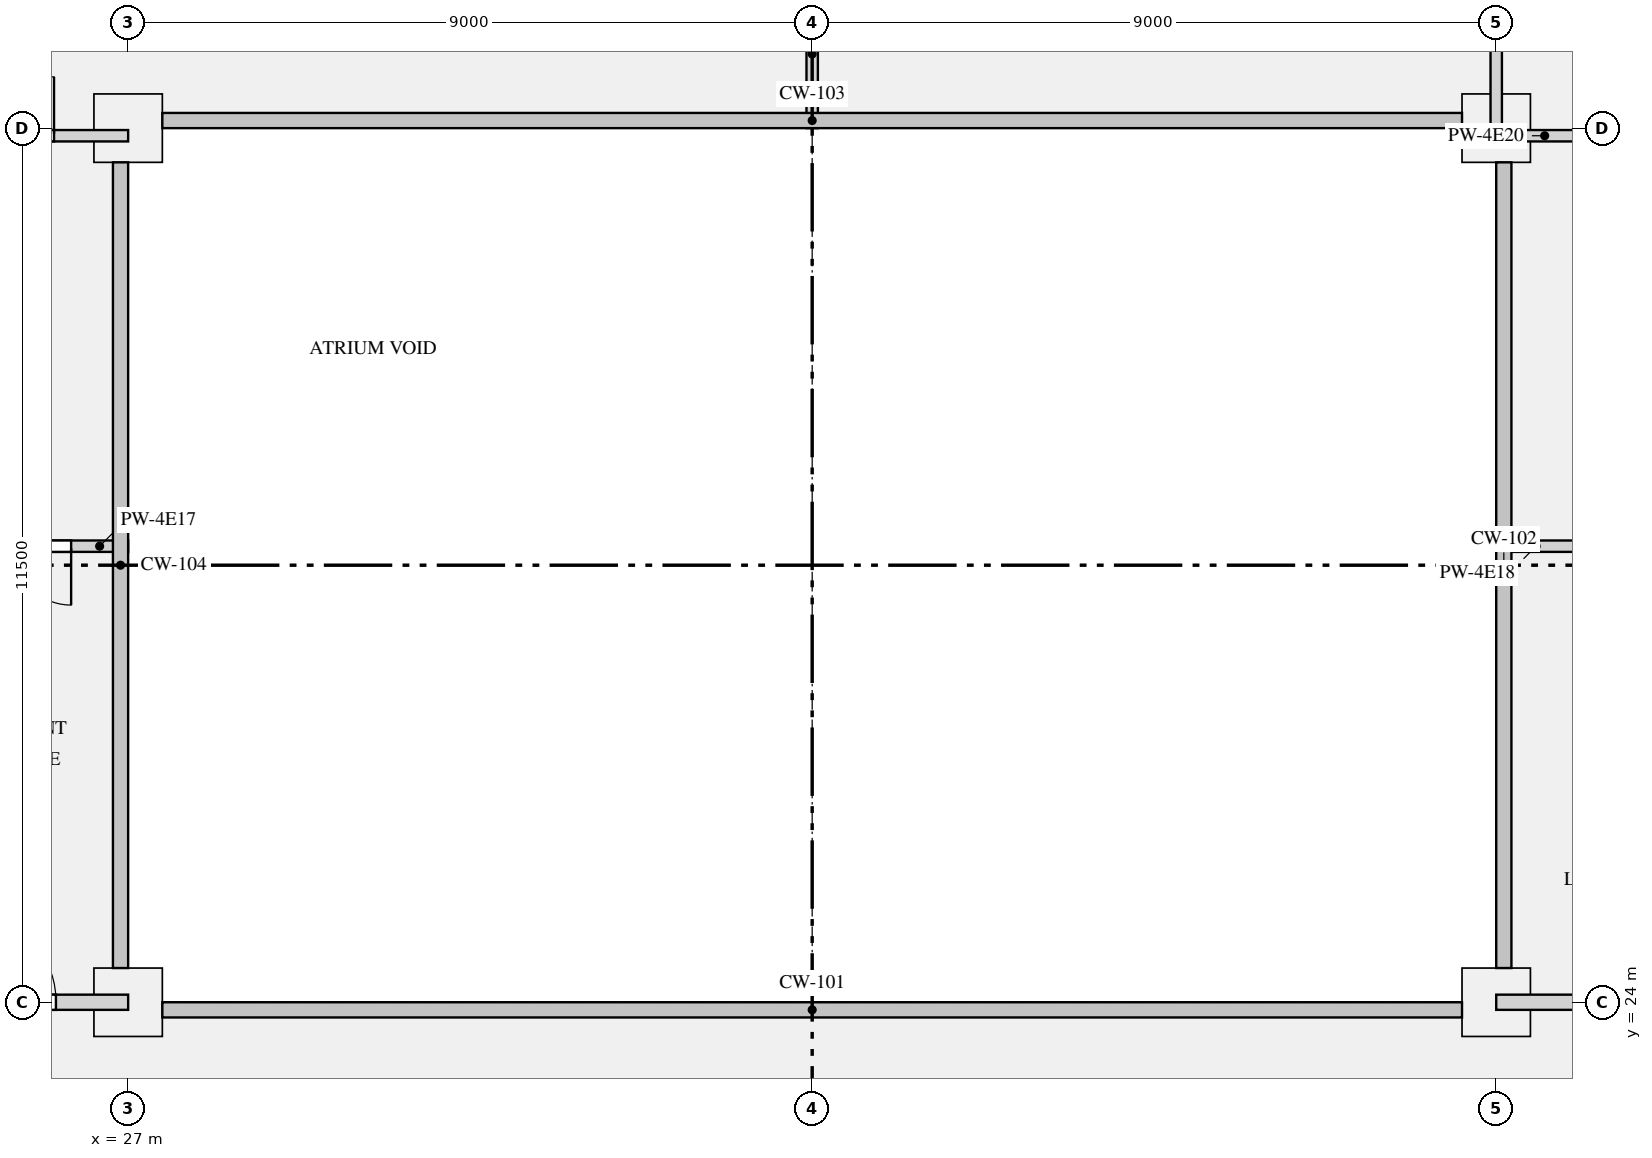
"""IFC4 building model, lengths in metres.
Left out: names, types, materials, properties, quantities, classifications, styles, units other than length and angle.
Written with IfcOpenShell. Run it as: python <this file> out.ifc"""

import sys

from ifc_helpers import new_model, si_unit, direction, frame, frame_2d, origin, origin_2d, place, context, subcontext, project, spatial, rectangle, extrude, element, fill, save


model = new_model("IFC4")
c1 = context("Model", 3, precision=1e-05, world=origin(), true_north=direction((0.0, 1.0)))
c2 = subcontext(c1, "Body", "Model", "MODEL_VIEW")
j1 = project(units=[si_unit("LENGTHUNIT", "METRE"), si_unit("PLANEANGLEUNIT", "RADIAN")], contexts=[c1])
p1 = place(None, origin())
s1 = spatial("IfcSite", under=j1, at=p1, CompositionType="ELEMENT")
p2 = place(p1, origin())
s2 = spatial("IfcBuilding", under=s1, at=p2, CompositionType="ELEMENT")
p3 = place(p2, frame((0.0, 0.0, 232.65)))
s3 = spatial("IfcBuildingStorey", under=s2, at=p3, CompositionType="ELEMENT", Elevation=232.65)
for number, where, z_axis, x_axis in (
    (1, (27.0, 24.0, 0.0), (0.0, 0.0, 1.0), (1.0, 0.0, 0.0)),
    (2, (45.0, 24.0, 0.0), (0.0, 0.0, 1.0), (1.0, 0.0, 0.0)),
    (3, (27.0, 35.5, 0.0), (0.0, 0.0, 1.0), (1.0, 0.0, 0.0)),
    (4, (45.0, 35.5, 0.0), (0.0, 0.0, 1.0), (1.0, 0.0, 0.0)),
):
    element("IfcColumn", number, at=place(p3, frame(where, z_axis=z_axis, x_axis=x_axis)), inside=s3, PredefinedType="COLUMN", context=c2, shape_type="SweptSolid", body=[
        extrude(rectangle(XDim=0.9, YDim=0.9, at=origin_2d()), origin(), (0.0, 0.0, 1.0), 3.15),
    ])
p4 = place(p3, frame((23.9, 24.0, 0.0), z_axis=(0.0, 0.0, 1.0), x_axis=(1.0, 0.0, 0.0)))
e5 = element("IfcWall", 5, at=p4, inside=s3, PredefinedType="PARTITIONING", context=c2, shape_type="SweptSolid", body=[
    extrude(rectangle(XDim=3.1, YDim=0.2, at=frame_2d((1.55, 0.0))), origin(), (0.0, 0.0, 1.0), 2.8),
])
p5 = place(p4, frame((1.05, 0.0, 0.0)))
e6 = element("IfcOpeningElement", 6, at=p5, cuts=e5, PredefinedType="OPENING", context=c2, shape_type="SweptSolid", body=[
    extrude(rectangle(XDim=1.1, YDim=2.1, at=frame_2d((0.55, 1.05))), frame((0.0, 0.11, 0.0), z_axis=(0.0, -1.0, 0.0), x_axis=(1.0, 0.0, 0.0)), (0.0, 0.0, 1.0), 0.22),
])
p6 = place(p3, frame((45.0, 24.0, 0.0), z_axis=(0.0, 0.0, 1.0), x_axis=(1.0, 0.0, 0.0)))
e7 = element("IfcWall", 7, at=p6, inside=s3, PredefinedType="PARTITIONING", context=c2, shape_type="SweptSolid", body=[
    extrude(rectangle(XDim=3.1, YDim=0.2, at=frame_2d((1.55, 0.0))), origin(), (0.0, 0.0, 1.0), 2.8),
])
p7 = place(p3, frame((24.075, 30.0, 0.0), z_axis=(0.0, 0.0, 1.0), x_axis=(1.0, 0.0, 0.0)))
e8 = element("IfcWall", 8, at=p7, inside=s3, PredefinedType="PARTITIONING", context=c2, shape_type="SweptSolid", body=[
    extrude(rectangle(XDim=2.925, YDim=0.15, at=frame_2d((1.462, 0.0))), origin(), (0.0, 0.0, 1.0), 2.8),
])
p8 = place(p7, frame((0.675, 0.0, 0.0)))
e9 = element("IfcOpeningElement", 9, at=p8, cuts=e8, PredefinedType="OPENING", context=c2, shape_type="SweptSolid", body=[
    extrude(rectangle(XDim=1.5, YDim=2.1, at=frame_2d((0.75, 1.05))), frame((0.0, 0.085, 0.0), z_axis=(0.0, -1.0, 0.0), x_axis=(1.0, 0.0, 0.0)), (0.0, 0.0, 1.0), 0.17),
])
p9 = place(p3, frame((45.0, 30.0, 0.0), z_axis=(0.0, 0.0, 1.0), x_axis=(1.0, 0.0, 0.0)))
e10 = element("IfcWall", 10, at=p9, inside=s3, PredefinedType="PARTITIONING", context=c2, shape_type="SweptSolid", body=[
    extrude(rectangle(XDim=2.9, YDim=0.15, at=frame_2d((1.45, 0.0))), origin(), (0.0, 0.0, 1.0), 2.8),
])
p10 = place(p9, frame((1.05, 0.0, 0.0)))
e11 = element("IfcOpeningElement", 11, at=p10, cuts=e10, PredefinedType="OPENING", context=c2, shape_type="SweptSolid", body=[
    extrude(rectangle(XDim=0.9, YDim=2.1, at=frame_2d((0.45, 1.05))), frame((0.0, 0.085, 0.0), z_axis=(0.0, -1.0, 0.0), x_axis=(1.0, 0.0, 0.0)), (0.0, 0.0, 1.0), 0.17),
])
p11 = place(p3, frame((15.8, 35.4, 0.0), z_axis=(0.0, 0.0, 1.0), x_axis=(1.0, 0.0, 0.0)))
e12 = element("IfcWall", 12, at=p11, inside=s3, PredefinedType="PARTITIONING", context=c2, shape_type="SweptSolid", body=[
    extrude(rectangle(XDim=11.2, YDim=0.15, at=frame_2d((5.6, 0.0))), origin(), (0.0, 0.0, 1.0), 2.8),
])
p12 = place(p11, frame((8.725, 0.0, 0.0)))
e13 = element("IfcOpeningElement", 13, at=p12, cuts=e12, PredefinedType="OPENING", context=c2, shape_type="SweptSolid", body=[
    extrude(rectangle(XDim=1.5, YDim=2.1, at=frame_2d((0.75, 1.05))), frame((0.0, 0.085, 0.0), z_axis=(0.0, -1.0, 0.0), x_axis=(1.0, 0.0, 0.0)), (0.0, 0.0, 1.0), 0.17),
])
p13 = place(p11, frame((7.0, 0.0, 0.0)))
e14 = element("IfcOpeningElement", 14, at=p13, cuts=e12, PredefinedType="OPENING", context=c2, shape_type="SweptSolid", body=[
    extrude(rectangle(XDim=0.9, YDim=2.1, at=frame_2d((0.45, 1.05))), frame((0.0, 0.085, 0.0), z_axis=(0.0, -1.0, 0.0), x_axis=(1.0, 0.0, 0.0)), (0.0, 0.0, 1.0), 0.17),
])
p14 = place(p11, frame((3.225, 0.0, 0.0)))
e15 = element("IfcOpeningElement", 15, at=p14, cuts=e12, PredefinedType="OPENING", context=c2, shape_type="SweptSolid", body=[
    extrude(rectangle(XDim=0.9, YDim=2.1, at=frame_2d((0.45, 1.05))), frame((0.0, 0.085, 0.0), z_axis=(0.0, -1.0, 0.0), x_axis=(1.0, 0.0, 0.0)), (0.0, 0.0, 1.0), 0.17),
])
p15 = place(p3, frame((45.0, 35.4, 0.0), z_axis=(0.0, 0.0, 1.0), x_axis=(1.0, 0.0, 0.0)))
e16 = element("IfcWall", 16, at=p15, inside=s3, PredefinedType="PARTITIONING", context=c2, shape_type="SweptSolid", body=[
    extrude(rectangle(XDim=3.1, YDim=0.15, at=frame_2d((1.55, 0.0))), origin(), (0.0, 0.0, 1.0), 2.8),
])
p16 = place(p15, frame((1.275, 0.0, 0.0)))
e17 = element("IfcOpeningElement", 17, at=p16, cuts=e16, PredefinedType="OPENING", context=c2, shape_type="SweptSolid", body=[
    extrude(rectangle(XDim=0.9, YDim=2.1, at=frame_2d((0.45, 1.05))), frame((0.0, 0.085, 0.0), z_axis=(0.0, -1.0, 0.0), x_axis=(1.0, 0.0, 0.0)), (0.0, 0.0, 1.0), 0.17),
])
p17 = place(p3, frame((36.0, 35.5, 0.0), z_axis=(0.0, 0.0, 1.0), x_axis=(0.0, 1.0, 0.0)))
e18 = element("IfcWall", 18, at=p17, inside=s3, PredefinedType="PARTITIONING", context=c2, shape_type="SweptSolid", body=[
    extrude(rectangle(XDim=5.35, YDim=0.15, at=frame_2d((2.675, 0.0))), origin(), (0.0, 0.0, 1.0), 2.8),
])
p18 = place(p17, frame((1.95, 0.0, 0.0)))
e19 = element("IfcOpeningElement", 19, at=p18, cuts=e18, PredefinedType="OPENING", context=c2, shape_type="SweptSolid", body=[
    extrude(rectangle(XDim=1.5, YDim=2.1, at=frame_2d((0.75, 1.05))), frame((0.0, 0.085, 0.0), z_axis=(0.0, -1.0, 0.0), x_axis=(1.0, 0.0, 0.0)), (0.0, 0.0, 1.0), 0.17),
])
p19 = place(p3, frame((45.0, 35.5, 0.0), z_axis=(0.0, 0.0, 1.0), x_axis=(0.0, 1.0, 0.0)))
e20 = element("IfcWall", 20, at=p19, inside=s3, PredefinedType="PARTITIONING", context=c2, shape_type="SweptSolid", body=[
    extrude(rectangle(XDim=5.35, YDim=0.15, at=frame_2d((2.675, 0.0))), origin(), (0.0, 0.0, 1.0), 2.8),
])
p20 = place(p19, frame((2.525, 0.0, 0.0)))
e21 = element("IfcOpeningElement", 21, at=p20, cuts=e20, PredefinedType="OPENING", context=c2, shape_type="SweptSolid", body=[
    extrude(rectangle(XDim=0.9, YDim=2.1, at=frame_2d((0.45, 1.05))), frame((0.0, 0.085, 0.0), z_axis=(0.0, -1.0, 0.0), x_axis=(1.0, 0.0, 0.0)), (0.0, 0.0, 1.0), 0.17),
])
p21 = place(p5, origin())
e22 = element("IfcDoor", 22, at=p21, inside=s3, OperationType="SINGLE_SWING_LEFT", PredefinedType="DOOR", context=c2, shape_type="SweptSolid", body=[
    extrude(rectangle(XDim=1.1, YDim=2.1, at=frame_2d((0.55, 1.05))), frame((0.0, 0.025, 0.0), z_axis=(0.0, -1.0, 0.0), x_axis=(1.0, 0.0, 0.0)), (0.0, 0.0, 1.0), 0.05),
])
fill(e6, e22)
p22 = place(p8, frame((1.5, 0.0, 0.0), z_axis=(0.0, 0.0, 1.0), x_axis=(-1.0, 0.0, 0.0)))
e23 = element("IfcDoor", 23, at=p22, inside=s3, OperationType="DOUBLE_DOOR_SINGLE_SWING", PredefinedType="DOOR", context=c2, shape_type="SweptSolid", body=[
    extrude(rectangle(XDim=1.5, YDim=2.1, at=frame_2d((0.75, 1.05))), frame((0.0, 0.025, 0.0), z_axis=(0.0, -1.0, 0.0), x_axis=(1.0, 0.0, 0.0)), (0.0, 0.0, 1.0), 0.05),
])
fill(e9, e23)
p23 = place(p12, origin())
e24 = element("IfcDoor", 24, at=p23, inside=s3, OperationType="DOUBLE_DOOR_SINGLE_SWING", PredefinedType="DOOR", context=c2, shape_type="SweptSolid", body=[
    extrude(rectangle(XDim=1.5, YDim=2.1, at=frame_2d((0.75, 1.05))), frame((0.0, 0.025, 0.0), z_axis=(0.0, -1.0, 0.0), x_axis=(1.0, 0.0, 0.0)), (0.0, 0.0, 1.0), 0.05),
])
fill(e13, e24)
save(model, sys.argv[1])
